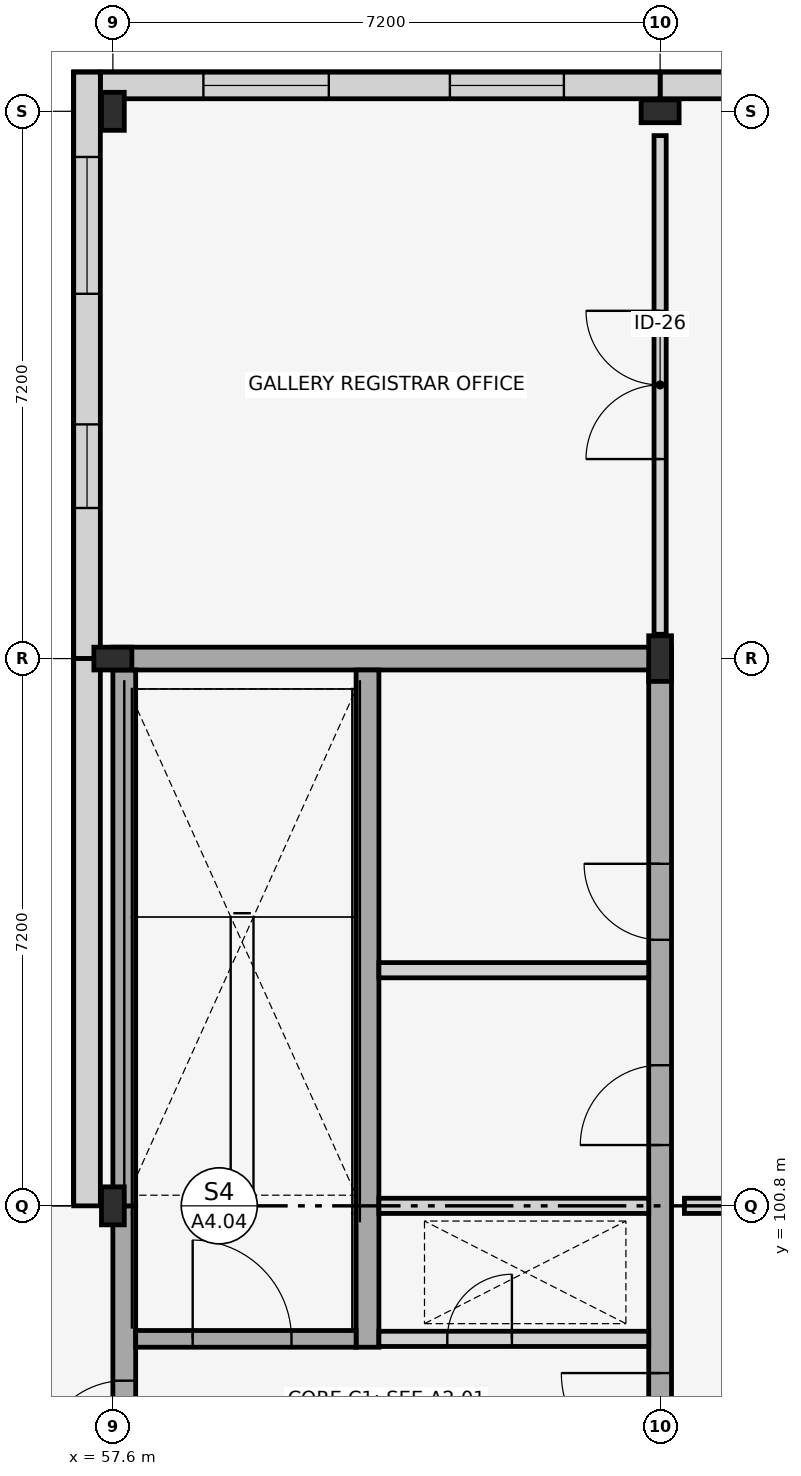
"""IFC4 building model, lengths in metres.
Left out: names, types, materials, properties, quantities, classifications, styles, units other than length and angle.
Written with IfcOpenShell. Run it as: python <this file> out.ifc"""

import sys

from ifc_helpers import new_model, si_unit, direction, frame, frame_2d, origin, origin_2d, place, context, subcontext, project, spatial, rectangle, i_section, extrude, element, fill, save


model = new_model("IFC4")
c1 = context("Model", 3, precision=1e-05, world=origin(), true_north=direction((0.0, 1.0)))
c2 = subcontext(c1, "Body", "Model", "MODEL_VIEW")
j1 = project(units=[si_unit("LENGTHUNIT", "METRE"), si_unit("PLANEANGLEUNIT", "RADIAN")], contexts=[c1])
p1 = place(None, origin())
s1 = spatial("IfcSite", under=j1, at=p1, CompositionType="ELEMENT")
p2 = place(p1, origin())
s2 = spatial("IfcBuilding", under=s1, at=p2, CompositionType="ELEMENT")
p3 = place(p2, origin())
s3 = spatial("IfcBuildingStorey", under=s2, at=p3, CompositionType="ELEMENT", Elevation=0.0)
for number, where, z_axis, x_axis in (
    (1, (57.6, 100.8, 0.0), (0.0, 0.0, 1.0), (1.0, 0.0, 0.0)),
    (2, (57.6, 108.0, 0.0), (0.0, 0.0, 1.0), (0.0, 1.0, 0.0)),
    (3, (57.6, 115.2, 0.0), (0.0, 0.0, 1.0), (1.0, 0.0, 0.0)),
):
    element("IfcColumn", number, at=place(p3, frame(where, z_axis=z_axis, x_axis=x_axis)), inside=s3, PredefinedType="COLUMN", context=c2, shape_type="SweptSolid", body=[
        extrude(i_section(OverallWidth=0.3, OverallDepth=0.5, WebThickness=0.014, FlangeThickness=0.028, FilletRadius=0.027, at=origin_2d()), origin(), (0.0, 0.0, 1.0), 4.5),
    ])
p4 = place(p3, frame((64.8, 108.0, 0.0), z_axis=(0.0, 0.0, 1.0), x_axis=(1.0, 0.0, 0.0)))
e4 = element("IfcColumn", 4, at=p4, inside=s3, PredefinedType="COLUMN", context=c2, shape_type="SweptSolid", body=[
    extrude(i_section(OverallWidth=0.3, OverallDepth=0.6, WebThickness=0.015, FlangeThickness=0.03, FilletRadius=0.027, at=origin_2d()), origin(), (0.0, 0.0, 1.0), 4.5),
])
p5 = place(p3, frame((64.8, 115.2, 0.0), z_axis=(0.0, 0.0, 1.0), x_axis=(0.0, 1.0, 0.0)))
e5 = element("IfcColumn", 5, at=p5, inside=s3, PredefinedType="COLUMN", context=c2, shape_type="SweptSolid", body=[
    extrude(i_section(OverallWidth=0.3, OverallDepth=0.5, WebThickness=0.014, FlangeThickness=0.028, FilletRadius=0.027, at=origin_2d()), origin(), (0.0, 0.0, 1.0), 4.5),
])
p6 = place(p3, frame((72.0, 115.54, 0.0), z_axis=(0.0, 0.0, 1.0), x_axis=(-1.0, 0.0, 0.0)))
e6 = element("IfcWall", 6, at=p6, inside=s3, PredefinedType="STANDARD", context=c2, shape_type="SweptSolid", body=[
    extrude(rectangle(XDim=7.2, YDim=0.35, at=frame_2d((3.6, 0.0))), origin(), (0.0, 0.0, 1.0), 4.5),
])
p7 = place(p6, frame((1.416, 0.0, 0.9)))
e7 = element("IfcOpeningElement", 7, at=p7, cuts=e6, PredefinedType="OPENING", context=c2, shape_type="SweptSolid", body=[
    extrude(rectangle(XDim=1.2, YDim=2.2, at=frame_2d((0.6, 1.1))), frame((0.0, 0.185, 0.0), z_axis=(0.0, -1.0, 0.0), x_axis=(1.0, 0.0, 0.0)), (0.0, 0.0, 1.0), 0.37),
])
p8 = place(p6, frame((4.509, 0.0, 0.9)))
e8 = element("IfcOpeningElement", 8, at=p8, cuts=e6, PredefinedType="OPENING", context=c2, shape_type="SweptSolid", body=[
    extrude(rectangle(XDim=1.35, YDim=2.2, at=frame_2d((0.675, 1.1))), frame((0.0, 0.185, 0.0), z_axis=(0.0, -1.0, 0.0), x_axis=(1.0, 0.0, 0.0)), (0.0, 0.0, 1.0), 0.37),
])
p9 = place(p3, frame((64.8, 115.54, 0.0), z_axis=(0.0, 0.0, 1.0), x_axis=(-1.0, 0.0, 0.0)))
e9 = element("IfcWall", 9, at=p9, inside=s3, PredefinedType="STANDARD", context=c2, shape_type="SweptSolid", body=[
    extrude(rectangle(XDim=7.365, YDim=0.35, at=frame_2d((3.683, 0.0))), origin(), (0.0, 0.0, 1.0), 4.5),
])
p10 = place(p9, frame((1.266, 0.0, 0.9)))
e10 = element("IfcOpeningElement", 10, at=p10, cuts=e9, PredefinedType="OPENING", context=c2, shape_type="SweptSolid", body=[
    extrude(rectangle(XDim=1.5, YDim=2.4, at=frame_2d((0.75, 1.2))), frame((0.0, 0.185, 0.0), z_axis=(0.0, -1.0, 0.0), x_axis=(1.0, 0.0, 0.0)), (0.0, 0.0, 1.0), 0.37),
])
p11 = place(p9, frame((4.359, 0.0, 0.9)))
e11 = element("IfcOpeningElement", 11, at=p11, cuts=e9, PredefinedType="OPENING", context=c2, shape_type="SweptSolid", body=[
    extrude(rectangle(XDim=1.65, YDim=2.4, at=frame_2d((0.825, 1.2))), frame((0.0, 0.185, 0.0), z_axis=(0.0, -1.0, 0.0), x_axis=(1.0, 0.0, 0.0)), (0.0, 0.0, 1.0), 0.37),
])
p12 = place(p3, frame((57.26, 115.715, 0.0), z_axis=(0.0, 0.0, 1.0), x_axis=(0.0, -1.0, 0.0)))
e12 = element("IfcWall", 12, at=p12, inside=s3, PredefinedType="STANDARD", context=c2, shape_type="SweptSolid", body=[
    extrude(rectangle(XDim=7.715, YDim=0.35, at=frame_2d((3.857, 0.0))), origin(), (0.0, 0.0, 1.0), 4.5),
])
p13 = place(p12, frame((1.116, 0.0, 0.9)))
e13 = element("IfcOpeningElement", 13, at=p13, cuts=e12, PredefinedType="OPENING", context=c2, shape_type="SweptSolid", body=[
    extrude(rectangle(XDim=1.8, YDim=2.4, at=frame_2d((0.9, 1.2))), frame((0.0, 0.185, 0.0), z_axis=(0.0, -1.0, 0.0), x_axis=(1.0, 0.0, 0.0)), (0.0, 0.0, 1.0), 0.37),
])
p14 = place(p12, frame((4.634, 0.0, 0.9)))
e14 = element("IfcOpeningElement", 14, at=p14, cuts=e12, PredefinedType="OPENING", context=c2, shape_type="SweptSolid", body=[
    extrude(rectangle(XDim=1.1, YDim=2.0, at=frame_2d((0.55, 1.0))), frame((0.0, 0.185, 0.0), z_axis=(0.0, -1.0, 0.0), x_axis=(1.0, 0.0, 0.0)), (0.0, 0.0, 1.0), 0.37),
])
p15 = place(p3, frame((57.26, 108.0, 0.0), z_axis=(0.0, 0.0, 1.0), x_axis=(0.0, -1.0, 0.0)))
e15 = element("IfcWall", 15, at=p15, inside=s3, PredefinedType="STANDARD", context=c2, shape_type="SweptSolid", body=[
    extrude(rectangle(XDim=7.2, YDim=0.35, at=frame_2d((3.6, 0.0))), origin(), (0.0, 0.0, 1.0), 4.5),
])
p16 = place(p3, frame((57.6, 108.0, 0.0), z_axis=(0.0, 0.0, 1.0), x_axis=(1.0, 0.0, 0.0)))
e16 = element("IfcWall", 16, at=p16, inside=s3, PredefinedType="SHEAR", context=c2, shape_type="SweptSolid", body=[
    extrude(rectangle(XDim=7.35, YDim=0.3, at=frame_2d((3.675, 0.0))), origin(), (0.0, 0.0, 1.0), 4.28),
])
p17 = place(p3, frame((57.75, 93.75, 0.0), z_axis=(0.0, 0.0, 1.0), x_axis=(0.0, 1.0, 0.0)))
e17 = element("IfcWall", 17, at=p17, inside=s3, PredefinedType="SHEAR", context=c2, shape_type="SweptSolid", body=[
    extrude(rectangle(XDim=7.05, YDim=0.3, at=frame_2d((3.525, 0.0))), origin(), (0.0, 0.0, 1.0), 4.28),
])
p18 = place(p17, frame((3.65, 0.0, 0.0)))
e18 = element("IfcOpeningElement", 18, at=p18, cuts=e17, PredefinedType="OPENING", context=c2, shape_type="SweptSolid", body=[
    extrude(rectangle(XDim=1.1, YDim=2.2, at=frame_2d((0.55, 1.1))), frame((0.0, 0.16, 0.0), z_axis=(0.0, -1.0, 0.0), x_axis=(1.0, 0.0, 0.0)), (0.0, 0.0, 1.0), 0.32),
])
p19 = place(p3, frame((57.75, 100.8, 0.0), z_axis=(0.0, 0.0, 1.0), x_axis=(0.0, 1.0, 0.0)))
e19 = element("IfcWall", 19, at=p19, inside=s3, PredefinedType="SHEAR", context=c2, shape_type="SweptSolid", body=[
    extrude(rectangle(XDim=7.05, YDim=0.3, at=frame_2d((3.525, 0.0))), origin(), (0.0, 0.0, 1.0), 4.28),
])
p20 = place(p3, frame((64.8, 93.75, 0.0), z_axis=(0.0, 0.0, 1.0), x_axis=(0.0, 1.0, 0.0)))
e20 = element("IfcWall", 20, at=p20, inside=s3, PredefinedType="SHEAR", context=c2, shape_type="SweptSolid", body=[
    extrude(rectangle(XDim=14.1, YDim=0.3, at=frame_2d((7.05, 0.0))), origin(), (0.0, 0.0, 1.0), 4.28),
])
p21 = place(p20, frame((3.55, 0.0, 0.0)))
e21 = element("IfcOpeningElement", 21, at=p21, cuts=e20, PredefinedType="OPENING", context=c2, shape_type="SweptSolid", body=[
    extrude(rectangle(XDim=1.3, YDim=2.2, at=frame_2d((0.65, 1.1))), frame((0.0, 0.16, 0.0), z_axis=(0.0, -1.0, 0.0), x_axis=(1.0, 0.0, 0.0)), (0.0, 0.0, 1.0), 0.32),
])
p22 = place(p20, frame((7.85, 0.0, 0.0)))
e22 = element("IfcOpeningElement", 22, at=p22, cuts=e20, PredefinedType="OPENING", context=c2, shape_type="SweptSolid", body=[
    extrude(rectangle(XDim=1.05, YDim=2.15, at=frame_2d((0.525, 1.075))), frame((0.0, 0.16, 0.0), z_axis=(0.0, -1.0, 0.0), x_axis=(1.0, 0.0, 0.0)), (0.0, 0.0, 1.0), 0.32),
])
p23 = place(p20, frame((10.55, 0.0, 0.0)))
e23 = element("IfcOpeningElement", 23, at=p23, cuts=e20, PredefinedType="OPENING", context=c2, shape_type="SweptSolid", body=[
    extrude(rectangle(XDim=1.0, YDim=2.15, at=frame_2d((0.5, 1.075))), frame((0.0, 0.16, 0.0), z_axis=(0.0, -1.0, 0.0), x_axis=(1.0, 0.0, 0.0)), (0.0, 0.0, 1.0), 0.32),
])
p24 = place(p3, frame((60.95, 98.94, 0.0), z_axis=(0.0, 0.0, 1.0), x_axis=(0.0, 1.0, 0.0)))
e24 = element("IfcWall", 24, at=p24, inside=s3, PredefinedType="SHEAR", context=c2, shape_type="SweptSolid", body=[
    extrude(rectangle(XDim=8.91, YDim=0.3, at=frame_2d((4.455, 0.0))), origin(), (0.0, 0.0, 1.0), 4.28),
])
p25 = place(p3, frame((61.1, 99.05, 0.0), z_axis=(0.0, 0.0, 1.0), x_axis=(1.0, 0.0, 0.0)))
e25 = element("IfcWall", 25, at=p25, inside=s3, PredefinedType="PLUMBINGWALL", context=c2, shape_type="SweptSolid", body=[
    extrude(rectangle(XDim=3.55, YDim=0.2, at=frame_2d((1.775, 0.0))), origin(), (0.0, 0.0, 1.0), 3.7),
])
p26 = place(p25, frame((0.9, 0.0, 0.0)))
e26 = element("IfcOpeningElement", 26, at=p26, cuts=e25, PredefinedType="OPENING", context=c2, shape_type="SweptSolid", body=[
    extrude(rectangle(XDim=0.85, YDim=2.05, at=frame_2d((0.425, 1.025))), frame((0.0, 0.11, 0.0), z_axis=(0.0, -1.0, 0.0), x_axis=(1.0, 0.0, 0.0)), (0.0, 0.0, 1.0), 0.22),
])
p27 = place(p3, frame((57.9, 99.05, 0.0), z_axis=(0.0, 0.0, 1.0), x_axis=(1.0, 0.0, 0.0)))
e27 = element("IfcWall", 27, at=p27, inside=s3, PredefinedType="SHEAR", context=c2, shape_type="SweptSolid", body=[
    extrude(rectangle(XDim=2.9, YDim=0.22, at=frame_2d((1.45, 0.0))), origin(), (0.0, 0.0, 1.0), 4.28),
])
p28 = place(p27, frame((0.75, 0.0, 0.0)))
e28 = element("IfcOpeningElement", 28, at=p28, cuts=e27, PredefinedType="OPENING", context=c2, shape_type="SweptSolid", body=[
    extrude(rectangle(XDim=1.3, YDim=2.2, at=frame_2d((0.65, 1.1))), frame((0.0, 0.12, 0.0), z_axis=(0.0, -1.0, 0.0), x_axis=(1.0, 0.0, 0.0)), (0.0, 0.0, 1.0), 0.24),
])
for number, where, z_axis, x_axis in (
    (29, (61.1, 100.8, 0.0), (0.0, 0.0, 1.0), (1.0, 0.0, 0.0)),
    (30, (61.1, 103.9, 0.0), (0.0, 0.0, 1.0), (1.0, 0.0, 0.0)),
):
    element("IfcWall", number, at=place(p3, frame(where, z_axis=z_axis, x_axis=x_axis)), inside=s3, PredefinedType="PLUMBINGWALL", context=c2, shape_type="SweptSolid", body=[
        extrude(rectangle(XDim=3.55, YDim=0.2, at=frame_2d((1.775, 0.0))), origin(), (0.0, 0.0, 1.0), 3.7),
    ])
p29 = place(p3, frame((65.12, 100.8, 0.0), z_axis=(0.0, 0.0, 1.0), x_axis=(1.0, 0.0, 0.0)))
e31 = element("IfcWall", 31, at=p29, inside=s3, PredefinedType="PARTITIONING", context=c2, shape_type="SweptSolid", body=[
    extrude(rectangle(XDim=28.16, YDim=0.2, at=frame_2d((14.08, 0.0))), origin(), (0.0, 0.0, 1.0), 3.45),
])
p30 = place(p29, frame((1.649, 0.0, 0.0)))
e32 = element("IfcOpeningElement", 32, at=p30, cuts=e31, PredefinedType="OPENING", context=c2, shape_type="SweptSolid", body=[
    extrude(rectangle(XDim=1.6, YDim=2.35, at=frame_2d((0.8, 1.175))), frame((0.0, 0.11, 0.0), z_axis=(0.0, -1.0, 0.0), x_axis=(1.0, 0.0, 0.0)), (0.0, 0.0, 1.0), 0.22),
])
p31 = place(p3, frame((64.8, 108.32, 0.0), z_axis=(0.0, 0.0, 1.0), x_axis=(0.0, 1.0, 0.0)))
e33 = element("IfcWall", 33, at=p31, inside=s3, PredefinedType="PARTITIONING", context=c2, shape_type="SweptSolid", body=[
    extrude(rectangle(XDim=6.56, YDim=0.16, at=frame_2d((3.28, 0.0))), origin(), (0.0, 0.0, 1.0), 3.45),
])
p32 = place(p31, frame((2.305, 0.0, 0.0)))
e34 = element("IfcOpeningElement", 34, at=p32, cuts=e33, PredefinedType="OPENING", context=c2, shape_type="SweptSolid", body=[
    extrude(rectangle(XDim=1.95, YDim=2.6, at=frame_2d((0.975, 1.3))), frame((0.0, 0.09, 0.0), z_axis=(0.0, -1.0, 0.0), x_axis=(1.0, 0.0, 0.0)), (0.0, 0.0, 1.0), 0.18),
])
p33 = place(p10, origin())
e35 = element("IfcWindow", 35, at=p33, inside=s3, PartitioningType="SINGLE_PANEL", PredefinedType="WINDOW", context=c2, shape_type="SweptSolid", body=[
    extrude(rectangle(XDim=1.5, YDim=2.4, at=frame_2d((0.75, 1.2))), frame((0.0, 0.03, 0.0), z_axis=(0.0, -1.0, 0.0), x_axis=(1.0, 0.0, 0.0)), (0.0, 0.0, 1.0), 0.06),
])
fill(e10, e35)
p34 = place(p11, origin())
e36 = element("IfcWindow", 36, at=p34, inside=s3, PartitioningType="SINGLE_PANEL", PredefinedType="WINDOW", context=c2, shape_type="SweptSolid", body=[
    extrude(rectangle(XDim=1.65, YDim=2.4, at=frame_2d((0.825, 1.2))), frame((0.0, 0.03, 0.0), z_axis=(0.0, -1.0, 0.0), x_axis=(1.0, 0.0, 0.0)), (0.0, 0.0, 1.0), 0.06),
])
fill(e11, e36)
p35 = place(p13, origin())
e37 = element("IfcWindow", 37, at=p35, inside=s3, PartitioningType="SINGLE_PANEL", PredefinedType="WINDOW", context=c2, shape_type="SweptSolid", body=[
    extrude(rectangle(XDim=1.8, YDim=2.4, at=frame_2d((0.9, 1.2))), frame((0.0, 0.03, 0.0), z_axis=(0.0, -1.0, 0.0), x_axis=(1.0, 0.0, 0.0)), (0.0, 0.0, 1.0), 0.06),
])
fill(e13, e37)
p36 = place(p14, origin())
e38 = element("IfcWindow", 38, at=p36, inside=s3, PartitioningType="SINGLE_PANEL", PredefinedType="WINDOW", context=c2, shape_type="SweptSolid", body=[
    extrude(rectangle(XDim=1.1, YDim=2.0, at=frame_2d((0.55, 1.0))), frame((0.0, 0.03, 0.0), z_axis=(0.0, -1.0, 0.0), x_axis=(1.0, 0.0, 0.0)), (0.0, 0.0, 1.0), 0.06),
])
fill(e14, e38)
p37 = place(p18, origin())
e39 = element("IfcDoor", 39, at=p37, inside=s3, OperationType="SINGLE_SWING_LEFT", PredefinedType="DOOR", context=c2, shape_type="SweptSolid", body=[
    extrude(rectangle(XDim=1.1, YDim=2.2, at=frame_2d((0.55, 1.1))), frame((0.0, 0.025, 0.0), z_axis=(0.0, -1.0, 0.0), x_axis=(1.0, 0.0, 0.0)), (0.0, 0.0, 1.0), 0.05),
])
fill(e18, e39)
p38 = place(p21, origin())
e40 = element("IfcDoor", 40, at=p38, inside=s3, OperationType="SINGLE_SWING_RIGHT", PredefinedType="DOOR", context=c2, shape_type="SweptSolid", body=[
    extrude(rectangle(XDim=1.3, YDim=2.2, at=frame_2d((0.65, 1.1))), frame((0.0, 0.025, 0.0), z_axis=(0.0, -1.0, 0.0), x_axis=(1.0, 0.0, 0.0)), (0.0, 0.0, 1.0), 0.05),
])
fill(e21, e40)
p39 = place(p22, origin())
e41 = element("IfcDoor", 41, at=p39, inside=s3, OperationType="SINGLE_SWING_LEFT", PredefinedType="DOOR", context=c2, shape_type="SweptSolid", body=[
    extrude(rectangle(XDim=1.05, YDim=2.15, at=frame_2d((0.525, 1.075))), frame((0.0, 0.025, 0.0), z_axis=(0.0, -1.0, 0.0), x_axis=(1.0, 0.0, 0.0)), (0.0, 0.0, 1.0), 0.05),
])
fill(e22, e41)
p40 = place(p23, origin())
e42 = element("IfcDoor", 42, at=p40, inside=s3, OperationType="SINGLE_SWING_RIGHT", PredefinedType="DOOR", context=c2, shape_type="SweptSolid", body=[
    extrude(rectangle(XDim=1.0, YDim=2.15, at=frame_2d((0.5, 1.075))), frame((0.0, 0.025, 0.0), z_axis=(0.0, -1.0, 0.0), x_axis=(1.0, 0.0, 0.0)), (0.0, 0.0, 1.0), 0.05),
])
fill(e23, e42)
p41 = place(p26, origin())
e43 = element("IfcDoor", 43, at=p41, inside=s3, OperationType="SINGLE_SWING_RIGHT", PredefinedType="TRAPDOOR", context=c2, shape_type="SweptSolid", body=[
    extrude(rectangle(XDim=0.85, YDim=2.05, at=frame_2d((0.425, 1.025))), frame((0.0, 0.025, 0.0), z_axis=(0.0, -1.0, 0.0), x_axis=(1.0, 0.0, 0.0)), (0.0, 0.0, 1.0), 0.05),
])
fill(e26, e43)
p42 = place(p28, origin())
e44 = element("IfcDoor", 44, at=p42, inside=s3, OperationType="SINGLE_SWING_LEFT", PredefinedType="DOOR", context=c2, shape_type="SweptSolid", body=[
    extrude(rectangle(XDim=1.3, YDim=2.2, at=frame_2d((0.65, 1.1))), frame((0.0, 0.025, 0.0), z_axis=(0.0, -1.0, 0.0), x_axis=(1.0, 0.0, 0.0)), (0.0, 0.0, 1.0), 0.05),
])
fill(e28, e44)
p43 = place(p32, origin())
e45 = element("IfcDoor", 45, at=p43, inside=s3, OperationType="DOUBLE_DOOR_SINGLE_SWING", PredefinedType="DOOR", context=c2, shape_type="SweptSolid", body=[
    extrude(rectangle(XDim=1.95, YDim=2.6, at=frame_2d((0.975, 1.3))), frame((0.0, 0.025, 0.0), z_axis=(0.0, -1.0, 0.0), x_axis=(1.0, 0.0, 0.0)), (0.0, 0.0, 1.0), 0.05),
])
fill(e34, e45)
save(model, sys.argv[1])
